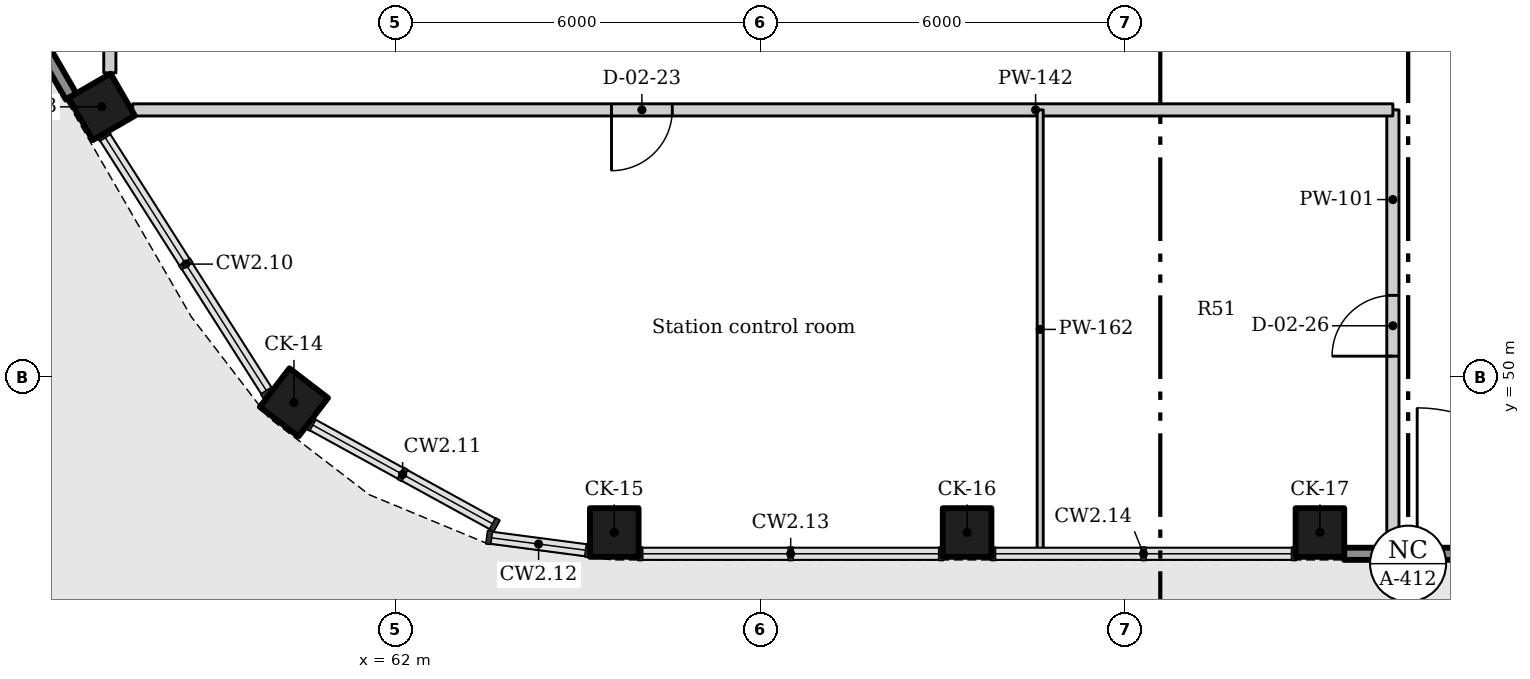
"""IFC4 building model, lengths in metres.
Left out: names, types, materials, properties, quantities, classifications, styles, units other than length and angle.
Written with IfcOpenShell. Run it as: python <this file> out.ifc"""

import sys

from ifc_helpers import new_model, si_unit, direction, frame, frame_2d, origin, origin_2d, place, context, subcontext, project, spatial, rectangle, extrude, element, fill, save


model = new_model("IFC4")
c1 = context("Model", 3, precision=1e-05, world=origin(), true_north=direction((0.0, 1.0)))
c2 = subcontext(c1, "Body", "Model", "MODEL_VIEW")
j1 = project(units=[si_unit("LENGTHUNIT", "METRE"), si_unit("PLANEANGLEUNIT", "RADIAN")], contexts=[c1])
p1 = place(None, origin())
s1 = spatial("IfcSite", under=j1, at=p1, CompositionType="ELEMENT")
p2 = place(p1, origin())
s2 = spatial("IfcBuilding", under=s1, at=p2, CompositionType="ELEMENT")
p3 = place(p2, origin())
s3 = spatial("IfcBuildingStorey", under=s2, at=p3, CompositionType="ELEMENT", Elevation=0.0)
for number, where, z_axis, x_axis in (
    (1, (57.166, 54.45, -1.8), (0.0, 0.0, 1.0), (0.5, -0.866, 0.0)),
    (2, (60.328, 49.589, -1.8), (0.0, 0.0, 1.0), (0.793, -0.609, 0.0)),
    (3, (65.596, 47.45, -1.8), (0.0, 0.0, 1.0), (1.0, 0.0, 0.0)),
    (4, (71.398, 47.45, -1.8), (0.0, 0.0, 1.0), (1.0, 0.0, 0.0)),
    (5, (77.2, 47.45, -1.8), (0.0, 0.0, 1.0), (1.0, 0.0, 0.0)),
):
    element("IfcColumn", number, at=place(p3, frame(where, z_axis=z_axis, x_axis=x_axis)), inside=s3, PredefinedType="COLUMN", context=c2, shape_type="SweptSolid", body=[
        extrude(rectangle(XDim=0.8, YDim=0.8, at=origin_2d()), origin(), (0.0, 0.0, 1.0), 8.4),
    ])
p4 = place(p3, frame((54.152, 58.969, 0.0), z_axis=(0.0, 0.0, 1.0), x_axis=(0.500011252833, -0.866018906861, 0.0)))
e6 = element("IfcWall", 6, at=p4, inside=s3, PredefinedType="SOLIDWALL", context=c2, shape_type="SweptSolid", body=[
    extrude(rectangle(XDim=5.025, YDim=0.2, at=frame_2d((2.512, 0.0))), origin(), (0.0, 0.0, 1.0), 5.4),
])
p5 = place(p4, frame((1.912, 0.0, 0.0)))
e7 = element("IfcOpeningElement", 7, at=p5, cuts=e6, PredefinedType="OPENING", context=c2, shape_type="SweptSolid", body=[
    extrude(rectangle(XDim=1.2, YDim=2.4, at=frame_2d((0.6, 1.2))), frame((0.0, 0.11, 0.0), z_axis=(0.0, -1.0, 0.0), x_axis=(1.0, 0.0, 0.0)), (0.0, 0.0, 1.0), 0.22),
])
p6 = place(p3, frame((77.596, 47.1, 0.0), z_axis=(0.0, 0.0, 1.0), x_axis=(1.0, 0.0, 0.0)))
e8 = element("IfcWall", 8, at=p6, inside=s3, PredefinedType="SOLIDWALL", context=c2, shape_type="SweptSolid", body=[
    extrude(rectangle(XDim=5.01, YDim=0.2, at=frame_2d((2.505, 0.0))), origin(), (0.0, 0.0, 1.0), 5.4),
])
p7 = place(p6, frame((1.204, 0.0, 0.0)))
e9 = element("IfcOpeningElement", 9, at=p7, cuts=e8, PredefinedType="OPENING", context=c2, shape_type="SweptSolid", body=[
    extrude(rectangle(XDim=2.4, YDim=2.7, at=frame_2d((1.2, 1.35))), frame((0.0, 0.11, 0.0), z_axis=(0.0, -1.0, 0.0), x_axis=(1.0, 0.0, 0.0)), (0.0, 0.0, 1.0), 0.22),
])
p8 = place(p3, frame((57.3, 55.009, 0.0), z_axis=(0.0, 0.0, 1.0), x_axis=(0.0, 1.0, 0.0)))
e10 = element("IfcWall", 10, at=p8, inside=s3, PredefinedType="PARTITIONING", context=c2, shape_type="SweptSolid", body=[
    extrude(rectangle(XDim=6.544, YDim=0.2, at=frame_2d((3.272, 0.0))), origin(), (0.0, 0.0, 1.0), 6.3),
])
p9 = place(p8, frame((2.772, 0.0, 0.0)))
e11 = element("IfcOpeningElement", 11, at=p9, cuts=e10, PredefinedType="OPENING", context=c2, shape_type="SweptSolid", body=[
    extrude(rectangle(XDim=1.0, YDim=2.1, at=frame_2d((0.5, 1.05))), frame((0.0, 0.11, 0.0), z_axis=(0.0, -1.0, 0.0), x_axis=(1.0, 0.0, 0.0)), (0.0, 0.0, 1.0), 0.22),
])
p10 = place(p3, frame((78.4, 47.3, 0.0), z_axis=(0.0, 0.0, 1.0), x_axis=(0.0, 1.0, 0.0)))
e12 = element("IfcWall", 12, at=p10, inside=s3, PredefinedType="PARTITIONING", context=c2, shape_type="SweptSolid", body=[
    extrude(rectangle(XDim=7.1, YDim=0.2, at=frame_2d((3.55, 0.0))), origin(), (0.0, 0.0, 1.0), 5.53),
])
p11 = place(p10, frame((3.05, 0.0, 0.0)))
e13 = element("IfcOpeningElement", 13, at=p11, cuts=e12, PredefinedType="OPENING", context=c2, shape_type="SweptSolid", body=[
    extrude(rectangle(XDim=1.0, YDim=2.1, at=frame_2d((0.5, 1.05))), frame((0.0, 0.11, 0.0), z_axis=(0.0, -1.0, 0.0), x_axis=(1.0, 0.0, 0.0)), (0.0, 0.0, 1.0), 0.22),
])
p12 = place(p3, frame((78.4, 54.4, 0.0), z_axis=(0.0, 0.0, 1.0), x_axis=(-1.0, 0.0, 0.0)))
e14 = element("IfcWall", 14, at=p12, inside=s3, PredefinedType="PARTITIONING", context=c2, shape_type="SweptSolid", body=[
    extrude(rectangle(XDim=20.723, YDim=0.2, at=frame_2d((10.362, 0.0))), origin(), (0.0, 0.0, 1.0), 6.3),
])
p13 = place(p12, frame((11.85, 0.0, 0.0)))
e15 = element("IfcOpeningElement", 15, at=p13, cuts=e14, PredefinedType="OPENING", context=c2, shape_type="SweptSolid", body=[
    extrude(rectangle(XDim=1.0, YDim=2.1, at=frame_2d((0.5, 1.05))), frame((0.0, 0.11, 0.0), z_axis=(0.0, -1.0, 0.0), x_axis=(1.0, 0.0, 0.0)), (0.0, 0.0, 1.0), 0.22),
])
p14 = place(p3, frame((72.6, 47.18, 0.0), z_axis=(0.0, 0.0, 1.0), x_axis=(0.0, 1.0, 0.0)))
e16 = element("IfcWall", 16, at=p14, inside=s3, PredefinedType="PARTITIONING", context=c2, shape_type="SweptSolid", body=[
    extrude(rectangle(XDim=7.22, YDim=0.1, at=frame_2d((3.61, 0.0))), origin(), (0.0, 0.0, 1.0), 5.53),
])
p15 = place(p7, frame((2.4, 0.0, 0.0), z_axis=(0.0, 0.0, 1.0), x_axis=(-1.0, 0.0, 0.0)))
e17 = element("IfcDoor", 17, at=p15, inside=s3, OperationType="DOUBLE_DOOR_DOUBLE_SWING", PredefinedType="DOOR", context=c2, shape_type="SweptSolid", body=[
    extrude(rectangle(XDim=2.4, YDim=2.7, at=frame_2d((1.2, 1.35))), frame((0.0, 0.025, 0.0), z_axis=(0.0, -1.0, 0.0), x_axis=(1.0, 0.0, 0.0)), (0.0, 0.0, 1.0), 0.05),
])
fill(e9, e17)
p16 = place(p13, origin())
e18 = element("IfcDoor", 18, at=p16, inside=s3, OperationType="SINGLE_SWING_RIGHT", PredefinedType="DOOR", context=c2, shape_type="SweptSolid", body=[
    extrude(rectangle(XDim=1.0, YDim=2.1, at=frame_2d((0.5, 1.05))), frame((0.0, 0.025, 0.0), z_axis=(0.0, -1.0, 0.0), x_axis=(1.0, 0.0, 0.0)), (0.0, 0.0, 1.0), 0.05),
])
fill(e15, e18)
p17 = place(p11, origin())
e19 = element("IfcDoor", 19, at=p17, inside=s3, OperationType="SINGLE_SWING_LEFT", PredefinedType="DOOR", context=c2, shape_type="SweptSolid", body=[
    extrude(rectangle(XDim=1.0, YDim=2.1, at=frame_2d((0.5, 1.05))), frame((0.0, 0.025, 0.0), z_axis=(0.0, -1.0, 0.0), x_axis=(1.0, 0.0, 0.0)), (0.0, 0.0, 1.0), 0.05),
])
fill(e13, e19)
save(model, sys.argv[1])
